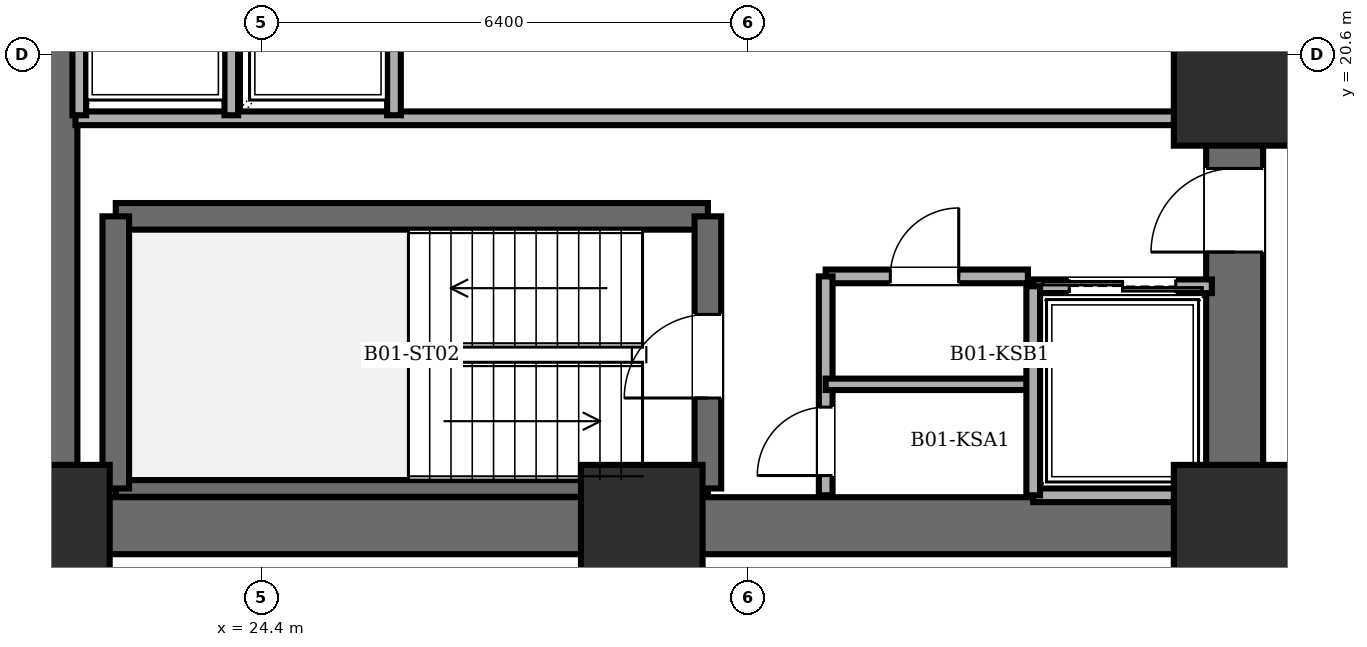
"""IFC4 building model, lengths in metres.
Left out: names, types, materials, properties, quantities, classifications, styles, units other than length and angle.
Written with IfcOpenShell. Run it as: python <this file> out.ifc"""

import sys

from ifc_helpers import new_model, si_unit, direction, frame, frame_2d, origin, origin_2d, place, context, subcontext, project, spatial, rectangle, extrude, element, fill, save


model = new_model("IFC4")
c1 = context("Model", 3, precision=1e-05, world=origin(), true_north=direction((0.0, 1.0)))
c2 = subcontext(c1, "Body", "Model", "MODEL_VIEW")
j1 = project(units=[si_unit("LENGTHUNIT", "METRE"), si_unit("PLANEANGLEUNIT", "RADIAN")], contexts=[c1])
p1 = place(None, origin())
s1 = spatial("IfcSite", under=j1, at=p1, CompositionType="ELEMENT")
p2 = place(p1, origin())
s2 = spatial("IfcBuilding", under=s1, at=p2, CompositionType="ELEMENT")
p3 = place(p2, frame((0.0, 0.0, -4.2)))
s3 = spatial("IfcBuildingStorey", under=s2, at=p3, CompositionType="ELEMENT", Elevation=-4.2)
for number, where, z_axis, x_axis in (
    (1, (21.6, 14.4, 0.0), (0.0, 0.0, 1.0), (1.0, 0.0, 0.0)),
    (2, (29.4, 14.4, 0.0), (0.0, 0.0, 1.0), (1.0, 0.0, 0.0)),
    (3, (37.2, 14.4, 0.0), (0.0, 0.0, 1.0), (1.0, 0.0, 0.0)),
    (4, (37.2, 20.2, 0.0), (0.0, 0.0, 1.0), (1.0, 0.0, 0.0)),
):
    element("IfcColumn", number, at=place(p3, frame(where, z_axis=z_axis, x_axis=x_axis)), inside=s3, PredefinedType="COLUMN", context=c2, shape_type="SweptSolid", body=[
        extrude(rectangle(XDim=1.6, YDim=1.6, at=origin_2d()), origin(), (0.0, 0.0, 1.0), 4.2),
    ])
p4 = place(p3, frame((21.6, 14.4, 0.0), z_axis=(0.0, 0.0, 1.0), x_axis=(0.0, 1.0, 0.0)))
e5 = element("IfcWall", 5, at=p4, inside=s3, PredefinedType="SHEAR", context=c2, shape_type="SweptSolid", body=[
    extrude(rectangle(XDim=19.2, YDim=0.75, at=frame_2d((9.6, 0.0))), origin(), (0.0, 0.0, 1.0), 3.96),
])
p5 = place(p3, frame((37.2, 14.4, 0.0), z_axis=(0.0, 0.0, 1.0), x_axis=(-1.0, 0.0, 0.0)))
e6 = element("IfcWall", 6, at=p5, inside=s3, PredefinedType="SHEAR", context=c2, shape_type="SweptSolid", body=[
    extrude(rectangle(XDim=15.6, YDim=0.75, at=frame_2d((7.8, 0.0))), origin(), (0.0, 0.0, 1.0), 3.96),
])
p6 = place(p3, frame((37.2, 14.4, 0.0), z_axis=(0.0, 0.0, 1.0), x_axis=(0.0, 1.0, 0.0)))
e7 = element("IfcWall", 7, at=p6, inside=s3, PredefinedType="SHEAR", context=c2, shape_type="SweptSolid", body=[
    extrude(rectangle(XDim=19.2, YDim=0.75, at=frame_2d((9.6, 0.0))), origin(), (0.0, 0.0, 1.0), 3.96),
])
p7 = place(p6, frame((15.8, 0.0, 0.0)))
e8 = element("IfcOpeningElement", 8, at=p7, cuts=e7, PredefinedType="OPENING", context=c2, shape_type="SweptSolid", body=[
    extrude(rectangle(XDim=1.15, YDim=2.15, at=frame_2d((0.575, 1.075))), frame((0.0, 0.385, 0.0), z_axis=(0.0, -1.0, 0.0), x_axis=(1.0, 0.0, 0.0)), (0.0, 0.0, 1.0), 0.77),
])
p8 = place(p6, frame((3.6, 0.0, 0.0)))
e9 = element("IfcOpeningElement", 9, at=p8, cuts=e7, PredefinedType="OPENING", context=c2, shape_type="SweptSolid", body=[
    extrude(rectangle(XDim=1.1, YDim=2.15, at=frame_2d((0.55, 1.075))), frame((0.0, 0.385, 0.0), z_axis=(0.0, -1.0, 0.0), x_axis=(1.0, 0.0, 0.0)), (0.0, 0.0, 1.0), 0.77),
])
p9 = place(p6, frame((8.6, 0.0, 0.0)))
e10 = element("IfcOpeningElement", 10, at=p9, cuts=e7, PredefinedType="OPENING", context=c2, shape_type="SweptSolid", body=[
    extrude(rectangle(XDim=1.3, YDim=2.2, at=frame_2d((0.65, 1.1))), frame((0.0, 0.385, 0.0), z_axis=(0.0, -1.0, 0.0), x_axis=(1.0, 0.0, 0.0)), (0.0, 0.0, 1.0), 0.77),
])
p10 = place(p3, frame((22.48, 18.47, 0.0), z_axis=(0.0, 0.0, 1.0), x_axis=(1.0, 0.0, 0.0)))
e11 = element("IfcWall", 11, at=p10, inside=s3, PredefinedType="SOLIDWALL", context=c2, shape_type="SweptSolid", body=[
    extrude(rectangle(XDim=7.79, YDim=0.35, at=frame_2d((3.895, 0.0))), origin(), (0.0, 0.0, 1.0), 3.96),
])
p11 = place(p3, frame((22.48, 14.89, 0.0), z_axis=(0.0, 0.0, 1.0), x_axis=(1.0, 0.0, 0.0)))
e12 = element("IfcWall", 12, at=p11, inside=s3, PredefinedType="PARTITIONING", context=c2, shape_type="SweptSolid", body=[
    extrude(rectangle(XDim=7.79, YDim=0.22, at=frame_2d((3.895, 0.0))), origin(), (0.0, 0.0, 1.0), 3.96),
])
p12 = place(p3, frame((22.48, 14.89, 0.0), z_axis=(0.0, 0.0, 1.0), x_axis=(0.0, 1.0, 0.0)))
e13 = element("IfcWall", 13, at=p12, inside=s3, PredefinedType="SOLIDWALL", context=c2, shape_type="SweptSolid", body=[
    extrude(rectangle(XDim=3.58, YDim=0.35, at=frame_2d((1.79, 0.0))), origin(), (0.0, 0.0, 1.0), 3.96),
])
p13 = place(p3, frame((30.27, 14.89, 0.0), z_axis=(0.0, 0.0, 1.0), x_axis=(0.0, 1.0, 0.0)))
e14 = element("IfcWall", 14, at=p13, inside=s3, PredefinedType="SOLIDWALL", context=c2, shape_type="SweptSolid", body=[
    extrude(rectangle(XDim=3.58, YDim=0.35, at=frame_2d((1.79, 0.0))), origin(), (0.0, 0.0, 1.0), 3.96),
])
p14 = place(p13, frame((1.19, 0.0, 0.0)))
e15 = element("IfcOpeningElement", 15, at=p14, cuts=e14, PredefinedType="OPENING", context=c2, shape_type="SweptSolid", body=[
    extrude(rectangle(XDim=1.1, YDim=2.15, at=frame_2d((0.55, 1.075))), frame((0.0, 0.185, 0.0), z_axis=(0.0, -1.0, 0.0), x_axis=(1.0, 0.0, 0.0)), (0.0, 0.0, 1.0), 0.37),
])
p15 = place(p3, frame((21.95, 19.76, 0.0), z_axis=(0.0, 0.0, 1.0), x_axis=(1.0, 0.0, 0.0)))
e16 = element("IfcWall", 16, at=p15, inside=s3, PredefinedType="PARTITIONING", context=c2, shape_type="SweptSolid", body=[
    extrude(rectangle(XDim=14.87, YDim=0.18, at=frame_2d((7.435, 0.0))), origin(), (0.0, 0.0, 1.0), 3.96),
])
p16 = place(p3, frame((31.82, 17.68, 0.0), z_axis=(0.0, 0.0, 1.0), x_axis=(1.0, 0.0, 0.0)))
e17 = element("IfcWall", 17, at=p16, inside=s3, PredefinedType="PARTITIONING", context=c2, shape_type="SweptSolid", body=[
    extrude(rectangle(XDim=2.66, YDim=0.18, at=frame_2d((1.33, 0.0))), origin(), (0.0, 0.0, 1.0), 3.96),
])
p17 = place(p16, frame((0.85, 0.0, 0.0)))
e18 = element("IfcOpeningElement", 18, at=p17, cuts=e17, PredefinedType="OPENING", context=c2, shape_type="SweptSolid", body=[
    extrude(rectangle(XDim=0.9, YDim=2.05, at=frame_2d((0.45, 1.025))), frame((0.0, 0.1, 0.0), z_axis=(0.0, -1.0, 0.0), x_axis=(1.0, 0.0, 0.0)), (0.0, 0.0, 1.0), 0.2),
])
p18 = place(p3, frame((31.82, 14.8, 0.0), z_axis=(0.0, 0.0, 1.0), x_axis=(0.0, 1.0, 0.0)))
e19 = element("IfcWall", 19, at=p18, inside=s3, PredefinedType="PARTITIONING", context=c2, shape_type="SweptSolid", body=[
    extrude(rectangle(XDim=2.88, YDim=0.18, at=frame_2d((1.44, 0.0))), origin(), (0.0, 0.0, 1.0), 3.96),
])
p19 = place(p18, frame((0.26, 0.0, 0.0)))
e20 = element("IfcOpeningElement", 20, at=p19, cuts=e19, PredefinedType="OPENING", context=c2, shape_type="SweptSolid", body=[
    extrude(rectangle(XDim=0.9, YDim=2.05, at=frame_2d((0.45, 1.025))), frame((0.0, 0.1, 0.0), z_axis=(0.0, -1.0, 0.0), x_axis=(1.0, 0.0, 0.0)), (0.0, 0.0, 1.0), 0.2),
])
p20 = place(p3, frame((31.82, 16.26, 0.0), z_axis=(0.0, 0.0, 1.0), x_axis=(1.0, 0.0, 0.0)))
e21 = element("IfcWall", 21, at=p20, inside=s3, PredefinedType="PARTITIONING", context=c2, shape_type="SweptSolid", body=[
    extrude(rectangle(XDim=2.66, YDim=0.15, at=frame_2d((1.33, 0.0))), origin(), (0.0, 0.0, 1.0), 3.96),
])
p21 = place(p3, frame((34.55, 17.55, 0.0), z_axis=(0.0, 0.0, 1.0), x_axis=(1.0, 0.0, 0.0)))
e22 = element("IfcWall", 22, at=p21, inside=s3, PredefinedType="PARTITIONING", context=c2, shape_type="SweptSolid", body=[
    extrude(rectangle(XDim=2.35, YDim=0.18, at=frame_2d((1.175, 0.0))), origin(), (0.0, 0.0, 1.0), 3.96),
])
p22 = place(p21, frame((0.475, 0.0, 0.0)))
e23 = element("IfcOpeningElement", 23, at=p22, cuts=e22, PredefinedType="OPENING", context=c2, shape_type="SweptSolid", body=[
    extrude(rectangle(XDim=1.4, YDim=2.3, at=frame_2d((0.7, 1.15))), frame((0.0, 0.1, 0.0), z_axis=(0.0, -1.0, 0.0), x_axis=(1.0, 0.0, 0.0)), (0.0, 0.0, 1.0), 0.2),
])
p23 = place(p3, frame((36.9, 14.8, 0.0), z_axis=(0.0, 0.0, 1.0), x_axis=(-1.0, 0.0, 0.0)))
e24 = element("IfcWall", 24, at=p23, inside=s3, PredefinedType="PARTITIONING", context=c2, shape_type="SweptSolid", body=[
    extrude(rectangle(XDim=2.35, YDim=0.18, at=frame_2d((1.175, 0.0))), origin(), (0.0, 0.0, 1.0), 3.96),
])
p24 = place(p3, frame((34.55, 17.55, 0.0), z_axis=(0.0, 0.0, 1.0), x_axis=(0.0, -1.0, 0.0)))
e25 = element("IfcWall", 25, at=p24, inside=s3, PredefinedType="PARTITIONING", context=c2, shape_type="SweptSolid", body=[
    extrude(rectangle(XDim=2.75, YDim=0.18, at=frame_2d((1.375, 0.0))), origin(), (0.0, 0.0, 1.0), 3.96),
])
for number, where, z_axis, x_axis in (
    (26, (24.0, 19.8, 0.0), (0.0, 0.0, 1.0), (0.0, 1.0, 0.0)),
    (27, (22.0, 22.3, 0.0), (0.0, 0.0, 1.0), (0.0, -1.0, 0.0)),
    (28, (26.14, 19.8, 0.0), (0.0, 0.0, 1.0), (0.0, 1.0, 0.0)),
):
    element("IfcWall", number, at=place(p3, frame(where, z_axis=z_axis, x_axis=x_axis)), inside=s3, PredefinedType="PARTITIONING", context=c2, shape_type="SweptSolid", body=[
        extrude(rectangle(XDim=2.5, YDim=0.18, at=frame_2d((1.25, 0.0))), origin(), (0.0, 0.0, 1.0), 3.96),
    ])
p25 = place(p14, origin())
e29 = element("IfcDoor", 29, at=p25, inside=s3, OperationType="SINGLE_SWING_LEFT", PredefinedType="DOOR", context=c2, shape_type="SweptSolid", body=[
    extrude(rectangle(XDim=1.1, YDim=2.15, at=frame_2d((0.55, 1.075))), frame((0.0, 0.025, 0.0), z_axis=(0.0, -1.0, 0.0), x_axis=(1.0, 0.0, 0.0)), (0.0, 0.0, 1.0), 0.05),
])
fill(e15, e29)
p26 = place(p8, origin())
e30 = element("IfcDoor", 30, at=p26, inside=s3, OperationType="SINGLE_SWING_LEFT", PredefinedType="DOOR", context=c2, shape_type="SweptSolid", body=[
    extrude(rectangle(XDim=1.1, YDim=2.15, at=frame_2d((0.55, 1.075))), frame((0.0, 0.025, 0.0), z_axis=(0.0, -1.0, 0.0), x_axis=(1.0, 0.0, 0.0)), (0.0, 0.0, 1.0), 0.05),
])
fill(e9, e30)
p27 = place(p17, origin())
e31 = element("IfcDoor", 31, at=p27, inside=s3, OperationType="SINGLE_SWING_RIGHT", PredefinedType="DOOR", context=c2, shape_type="SweptSolid", body=[
    extrude(rectangle(XDim=0.9, YDim=2.05, at=frame_2d((0.45, 1.025))), frame((0.0, 0.025, 0.0), z_axis=(0.0, -1.0, 0.0), x_axis=(1.0, 0.0, 0.0)), (0.0, 0.0, 1.0), 0.05),
])
fill(e18, e31)
p28 = place(p19, origin())
e32 = element("IfcDoor", 32, at=p28, inside=s3, OperationType="SINGLE_SWING_LEFT", PredefinedType="DOOR", context=c2, shape_type="SweptSolid", body=[
    extrude(rectangle(XDim=0.9, YDim=2.05, at=frame_2d((0.45, 1.025))), frame((0.0, 0.025, 0.0), z_axis=(0.0, -1.0, 0.0), x_axis=(1.0, 0.0, 0.0)), (0.0, 0.0, 1.0), 0.05),
])
fill(e20, e32)
p29 = place(p22, origin())
e33 = element("IfcDoor", 33, at=p29, inside=s3, OperationType="DOUBLE_DOOR_SLIDING", PredefinedType="DOOR", context=c2, shape_type="SweptSolid", body=[
    extrude(rectangle(XDim=1.4, YDim=2.3, at=frame_2d((0.7, 1.15))), frame((0.0, 0.025, 0.0), z_axis=(0.0, -1.0, 0.0), x_axis=(1.0, 0.0, 0.0)), (0.0, 0.0, 1.0), 0.05),
])
fill(e23, e33)
save(model, sys.argv[1])
